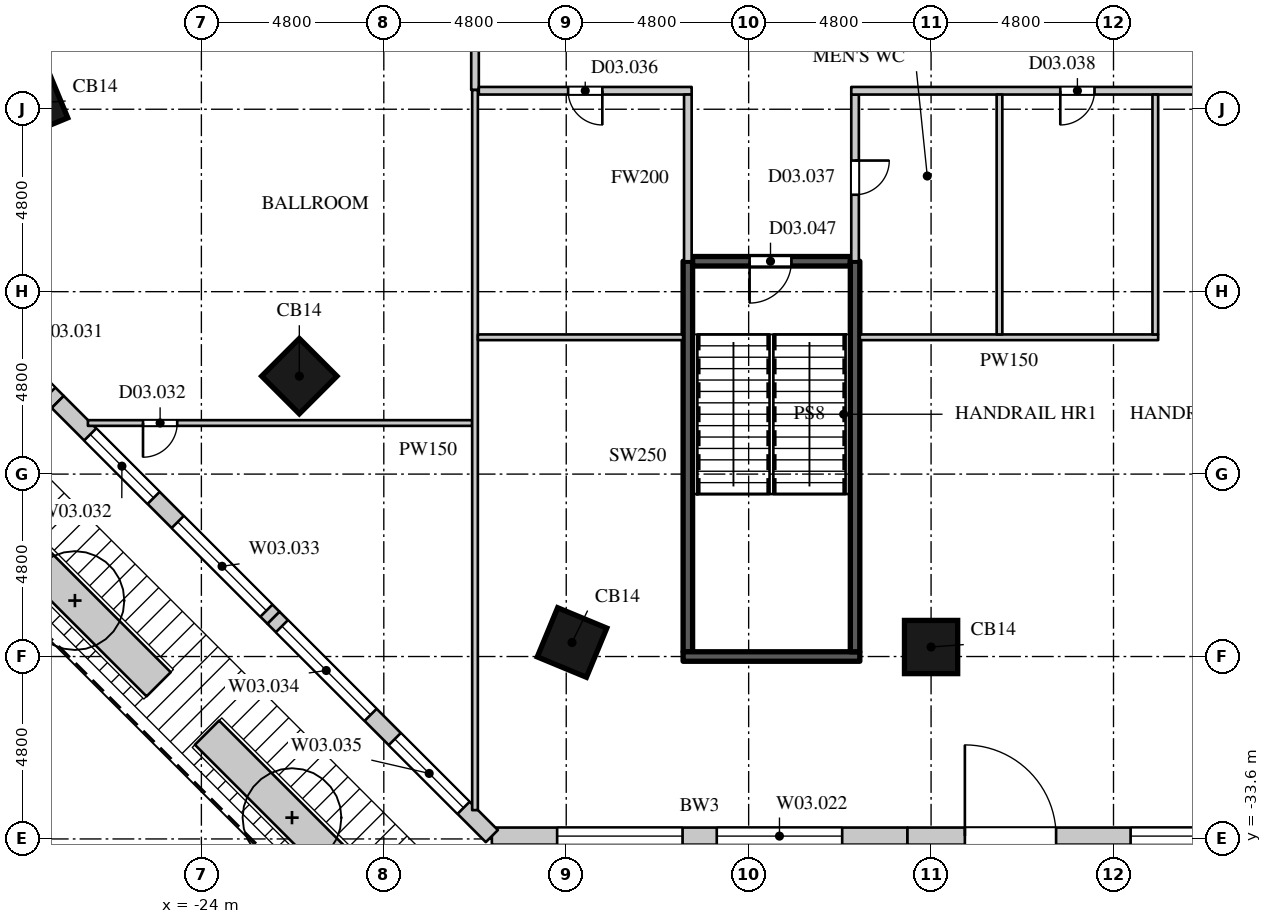
"""IFC4 building model, lengths in metres.
Left out: names, types, materials, properties, quantities, classifications, styles, units other than length and angle.
Written with IfcOpenShell. Run it as: python <this file> out.ifc"""

import sys

from ifc_helpers import new_model, si_unit, direction, frame, frame_2d, origin, origin_2d, place, context, subcontext, project, spatial, rectangle, extrude, element, fill, save


model = new_model("IFC4")
c1 = context("Model", 3, precision=1e-05, world=origin(), true_north=direction((0.0, 1.0)))
c2 = subcontext(c1, "Body", "Model", "MODEL_VIEW")
j1 = project(units=[si_unit("LENGTHUNIT", "METRE"), si_unit("PLANEANGLEUNIT", "RADIAN")], contexts=[c1])
p1 = place(None, origin())
s1 = spatial("IfcSite", under=j1, at=p1, CompositionType="ELEMENT")
p2 = place(p1, origin())
s2 = spatial("IfcBuilding", under=s1, at=p2, CompositionType="ELEMENT")
p3 = place(p2, frame((0.0, 0.0, 16.0)))
s3 = spatial("IfcBuildingStorey", under=s2, at=p3, CompositionType="ELEMENT", Elevation=16.0)
for number, where, z_axis, x_axis in (
    (1, (-4.8, -28.55, 0.0), (0.0, 0.0, 1.0), (1.0, 0.0, 0.0)),
    (2, (-14.247, -28.431, 0.0), (0.0, 0.0, 1.0), (0.924, -0.383, 0.0)),
    (3, (-21.423, -21.423, 0.0), (0.0, 0.0, 1.0), (0.707, -0.707, 0.0)),
    (4, (-28.431, -14.247, 0.0), (0.0, 0.0, 1.0), (0.383, -0.924, 0.0)),
):
    element("IfcColumn", number, at=place(p3, frame(where, z_axis=z_axis, x_axis=x_axis)), inside=s3, PredefinedType="COLUMN", context=c2, shape_type="SweptSolid", body=[
        extrude(rectangle(XDim=1.4, YDim=1.4, at=origin_2d()), origin(), (0.0, 0.0, 1.0), 5.0),
    ])
p4 = place(p3, frame((-33.525, -16.357, 0.0), z_axis=(0.0, 0.0, 1.0), x_axis=(0.707091755064, -0.70712180699, 0.0)))
e5 = element("IfcWall", 5, at=p4, inside=s3, PredefinedType="ELEMENTEDWALL", context=c2, shape_type="SweptSolid", body=[
    extrude(rectangle(XDim=8.124, YDim=0.45, at=frame_2d((4.062, 0.0))), origin(), (0.0, 0.0, 1.0), 4.7),
])
p5 = place(p4, frame((0.831, 0.0, 0.0)))
e6 = element("IfcOpeningElement", 6, at=p5, cuts=e5, PredefinedType="OPENING", context=c2, shape_type="SweptSolid", body=[
    extrude(rectangle(XDim=2.4, YDim=2.7, at=frame_2d((1.2, 1.35))), frame((0.0, 0.235, 0.0), z_axis=(0.0, -1.0, 0.0), x_axis=(1.0, 0.0, 0.0)), (0.0, 0.0, 1.0), 0.47),
])
p6 = place(p4, frame((4.512, 0.0, 1.05)))
e7 = element("IfcOpeningElement", 7, at=p6, cuts=e5, PredefinedType="OPENING", context=c2, shape_type="SweptSolid", body=[
    extrude(rectangle(XDim=3.3, YDim=2.7, at=frame_2d((1.65, 1.35))), frame((0.0, 0.235, 0.0), z_axis=(0.0, -1.0, 0.0), x_axis=(1.0, 0.0, 0.0)), (0.0, 0.0, 1.0), 0.47),
])
p7 = place(p3, frame((-27.781, -22.102, 0.0), z_axis=(0.0, 0.0, 1.0), x_axis=(0.707106781187, -0.707106781187, 0.0)))
e8 = element("IfcWall", 8, at=p7, inside=s3, PredefinedType="ELEMENTEDWALL", context=c2, shape_type="SweptSolid", body=[
    extrude(rectangle(XDim=8.031, YDim=0.45, at=frame_2d((4.016, 0.0))), origin(), (0.0, 0.0, 1.0), 4.7),
])
p8 = place(p7, frame((1.209, 0.0, 1.05)))
e9 = element("IfcOpeningElement", 9, at=p8, cuts=e8, PredefinedType="OPENING", context=c2, shape_type="SweptSolid", body=[
    extrude(rectangle(XDim=2.36, YDim=2.7, at=frame_2d((1.18, 1.35))), frame((0.0, 0.235, 0.0), z_axis=(0.0, -1.0, 0.0), x_axis=(1.0, 0.0, 0.0)), (0.0, 0.0, 1.0), 0.47),
])
p9 = place(p7, frame((4.465, 0.0, 1.05)))
e10 = element("IfcOpeningElement", 10, at=p9, cuts=e8, PredefinedType="OPENING", context=c2, shape_type="SweptSolid", body=[
    extrude(rectangle(XDim=3.3, YDim=2.7, at=frame_2d((1.65, 1.35))), frame((0.0, 0.235, 0.0), z_axis=(0.0, -1.0, 0.0), x_axis=(1.0, 0.0, 0.0)), (0.0, 0.0, 1.0), 0.47),
])
p10 = place(p3, frame((-22.102, -27.781, 0.0), z_axis=(0.0, 0.0, 1.0), x_axis=(0.70712180699, -0.707091755064, 0.0)))
e11 = element("IfcWall", 11, at=p10, inside=s3, PredefinedType="ELEMENTEDWALL", context=c2, shape_type="SweptSolid", body=[
    extrude(rectangle(XDim=8.124, YDim=0.45, at=frame_2d((4.062, 0.0))), origin(), (0.0, 0.0, 1.0), 4.7),
])
p11 = place(p10, frame((0.312, 0.0, 1.05)))
e12 = element("IfcOpeningElement", 12, at=p11, cuts=e11, PredefinedType="OPENING", context=c2, shape_type="SweptSolid", body=[
    extrude(rectangle(XDim=3.3, YDim=2.7, at=frame_2d((1.65, 1.35))), frame((0.0, 0.235, 0.0), z_axis=(0.0, -1.0, 0.0), x_axis=(1.0, 0.0, 0.0)), (0.0, 0.0, 1.0), 0.47),
])
p12 = place(p10, frame((4.512, 0.0, 1.05)))
e13 = element("IfcOpeningElement", 13, at=p12, cuts=e11, PredefinedType="OPENING", context=c2, shape_type="SweptSolid", body=[
    extrude(rectangle(XDim=2.56, YDim=2.7, at=frame_2d((1.28, 1.35))), frame((0.0, 0.235, 0.0), z_axis=(0.0, -1.0, 0.0), x_axis=(1.0, 0.0, 0.0)), (0.0, 0.0, 1.0), 0.47),
])
p13 = place(p3, frame((-16.357, -33.525, 0.0), z_axis=(0.0, 0.0, 1.0), x_axis=(1.0, 0.0, 0.0)))
e14 = element("IfcWall", 14, at=p13, inside=s3, PredefinedType="ELEMENTEDWALL", context=c2, shape_type="SweptSolid", body=[
    extrude(rectangle(XDim=10.936, YDim=0.45, at=frame_2d((5.468, 0.0))), origin(), (0.0, 0.0, 1.0), 4.7),
])
p14 = place(p13, frame((1.718, 0.0, 1.05)))
e15 = element("IfcOpeningElement", 15, at=p14, cuts=e14, PredefinedType="OPENING", context=c2, shape_type="SweptSolid", body=[
    extrude(rectangle(XDim=3.3, YDim=2.7, at=frame_2d((1.65, 1.35))), frame((0.0, 0.235, 0.0), z_axis=(0.0, -1.0, 0.0), x_axis=(1.0, 0.0, 0.0)), (0.0, 0.0, 1.0), 0.47),
])
p15 = place(p13, frame((5.918, 0.0, 1.05)))
e16 = element("IfcOpeningElement", 16, at=p15, cuts=e14, PredefinedType="OPENING", context=c2, shape_type="SweptSolid", body=[
    extrude(rectangle(XDim=3.3, YDim=2.7, at=frame_2d((1.65, 1.35))), frame((0.0, 0.235, 0.0), z_axis=(0.0, -1.0, 0.0), x_axis=(1.0, 0.0, 0.0)), (0.0, 0.0, 1.0), 0.47),
])
p16 = place(p3, frame((-5.421, -33.525, 0.0), z_axis=(0.0, 0.0, 1.0), x_axis=(1.0, 0.0, 0.0)))
e17 = element("IfcWall", 17, at=p16, inside=s3, PredefinedType="ELEMENTEDWALL", context=c2, shape_type="SweptSolid", body=[
    extrude(rectangle(XDim=10.843, YDim=0.45, at=frame_2d((5.421, 0.0))), origin(), (0.0, 0.0, 1.0), 4.7),
])
p17 = place(p16, frame((1.511, 0.0, 0.0)))
e18 = element("IfcOpeningElement", 18, at=p17, cuts=e17, PredefinedType="OPENING", context=c2, shape_type="SweptSolid", body=[
    extrude(rectangle(XDim=2.4, YDim=2.7, at=frame_2d((1.2, 1.35))), frame((0.0, 0.235, 0.0), z_axis=(0.0, -1.0, 0.0), x_axis=(1.0, 0.0, 0.0)), (0.0, 0.0, 1.0), 0.47),
])
p18 = place(p16, frame((5.871, 0.0, 1.05)))
e19 = element("IfcOpeningElement", 19, at=p18, cuts=e17, PredefinedType="OPENING", context=c2, shape_type="SweptSolid", body=[
    extrude(rectangle(XDim=3.3, YDim=2.7, at=frame_2d((1.65, 1.35))), frame((0.0, 0.235, 0.0), z_axis=(0.0, -1.0, 0.0), x_axis=(1.0, 0.0, 0.0)), (0.0, 0.0, 1.0), 0.47),
])
p19 = place(p3, frame((-29.531, -25.125, 0.0), z_axis=(0.0, 0.0, 1.0), x_axis=(0.707106781187, -0.707106781187, 0.0)))
e20 = element("IfcWall", 20, at=p19, inside=s3, PredefinedType="USERDEFINED", context=c2, shape_type="SweptSolid", body=[
    extrude(rectangle(XDim=6.231, YDim=0.9, at=frame_2d((3.115, 0.0))), origin(), (0.0, 0.0, 1.0), 0.9),
])
p20 = place(p3, frame((-23.852, -30.803, 0.0), z_axis=(0.0, 0.0, 1.0), x_axis=(0.70708747847, -0.707126083377, 0.0)))
e21 = element("IfcWall", 21, at=p20, inside=s3, PredefinedType="USERDEFINED", context=c2, shape_type="SweptSolid", body=[
    extrude(rectangle(XDim=6.324, YDim=0.9, at=frame_2d((3.162, 0.0))), origin(), (0.0, 0.0, 1.0), 0.9),
])
p21 = place(p3, frame((-16.8, -13.894, 0.0), z_axis=(0.0, 0.0, 1.0), x_axis=(0.0, 1.0, 0.0)))
e22 = element("IfcWall", 22, at=p21, inside=s3, PredefinedType="PARTITIONING", context=c2, shape_type="SweptSolid", body=[
    extrude(rectangle(XDim=2.594, YDim=0.2, at=frame_2d((1.297, 0.0))), origin(), (0.0, 0.0, 1.0), 4.4),
])
p22 = place(p3, frame((-16.7, -13.914, 0.0), z_axis=(0.0, 0.0, 1.0), x_axis=(1.0, 0.0, 0.0)))
e23 = element("IfcWall", 23, at=p22, inside=s3, PredefinedType="PARTITIONING", context=c2, shape_type="SweptSolid", body=[
    extrude(rectangle(XDim=5.6, YDim=0.2, at=frame_2d((2.8, 0.0))), origin(), (0.0, 0.0, 1.0), 4.4),
])
p23 = place(p22, frame((2.35, 0.0, 0.0)))
e24 = element("IfcOpeningElement", 24, at=p23, cuts=e23, PredefinedType="OPENING", context=c2, shape_type="SweptSolid", body=[
    extrude(rectangle(XDim=0.9, YDim=2.2, at=frame_2d((0.45, 1.1))), frame((0.0, 0.11, 0.0), z_axis=(0.0, -1.0, 0.0), x_axis=(1.0, 0.0, 0.0)), (0.0, 0.0, 1.0), 0.22),
])
p24 = place(p3, frame((-11.2, -18.4, 0.0), z_axis=(0.0, 0.0, 1.0), x_axis=(0.0, 1.0, 0.0)))
e25 = element("IfcWall", 25, at=p24, inside=s3, PredefinedType="PARTITIONING", context=c2, shape_type="SweptSolid", body=[
    extrude(rectangle(XDim=4.386, YDim=0.2, at=frame_2d((2.193, 0.0))), origin(), (0.0, 0.0, 1.0), 4.4),
])
p25 = place(p3, frame((-6.8, -18.4, 0.0), z_axis=(0.0, 0.0, 1.0), x_axis=(0.0, 1.0, 0.0)))
e26 = element("IfcWall", 26, at=p25, inside=s3, PredefinedType="PARTITIONING", context=c2, shape_type="SweptSolid", body=[
    extrude(rectangle(XDim=4.386, YDim=0.2, at=frame_2d((2.193, 0.0))), origin(), (0.0, 0.0, 1.0), 4.4),
])
p26 = place(p25, frame((1.75, 0.0, 0.0)))
e27 = element("IfcOpeningElement", 27, at=p26, cuts=e26, PredefinedType="OPENING", context=c2, shape_type="SweptSolid", body=[
    extrude(rectangle(XDim=0.9, YDim=2.2, at=frame_2d((0.45, 1.1))), frame((0.0, 0.11, 0.0), z_axis=(0.0, -1.0, 0.0), x_axis=(1.0, 0.0, 0.0)), (0.0, 0.0, 1.0), 0.22),
])
p27 = place(p3, frame((-6.9, -13.914, 0.0), z_axis=(0.0, 0.0, 1.0), x_axis=(1.0, 0.0, 0.0)))
e28 = element("IfcWall", 28, at=p27, inside=s3, PredefinedType="PARTITIONING", context=c2, shape_type="SweptSolid", body=[
    extrude(rectangle(XDim=13.8, YDim=0.2, at=frame_2d((6.9, 0.0))), origin(), (0.0, 0.0, 1.0), 4.4),
])
p28 = place(p27, frame((5.5, 0.0, 0.0)))
e29 = element("IfcOpeningElement", 29, at=p28, cuts=e28, PredefinedType="OPENING", context=c2, shape_type="SweptSolid", body=[
    extrude(rectangle(XDim=0.9, YDim=2.2, at=frame_2d((0.45, 1.1))), frame((0.0, 0.11, 0.0), z_axis=(0.0, -1.0, 0.0), x_axis=(1.0, 0.0, 0.0)), (0.0, 0.0, 1.0), 0.22),
])
p29 = place(p27, frame((10.05, 0.0, 0.0)))
e30 = element("IfcOpeningElement", 30, at=p29, cuts=e28, PredefinedType="OPENING", context=c2, shape_type="SweptSolid", body=[
    extrude(rectangle(XDim=1.6, YDim=2.4, at=frame_2d((0.8, 1.2))), frame((0.0, 0.11, 0.0), z_axis=(0.0, -1.0, 0.0), x_axis=(1.0, 0.0, 0.0)), (0.0, 0.0, 1.0), 0.22),
])
p30 = place(p3, frame((-26.986, -22.656, 0.0), z_axis=(0.0, 0.0, 1.0), x_axis=(1.0, 0.0, 0.0)))
e31 = element("IfcWall", 31, at=p30, inside=s3, PredefinedType="PARTITIONING", context=c2, shape_type="SweptSolid", body=[
    extrude(rectangle(XDim=10.111, YDim=0.15, at=frame_2d((5.055, 0.0))), origin(), (0.0, 0.0, 1.0), 4.4),
])
p31 = place(p30, frame((1.45, 0.0, 0.0)))
e32 = element("IfcOpeningElement", 32, at=p31, cuts=e31, PredefinedType="OPENING", context=c2, shape_type="SweptSolid", body=[
    extrude(rectangle(XDim=0.9, YDim=2.2, at=frame_2d((0.45, 1.1))), frame((0.0, 0.085, 0.0), z_axis=(0.0, -1.0, 0.0), x_axis=(1.0, 0.0, 0.0)), (0.0, 0.0, 1.0), 0.17),
])
p32 = place(p3, frame((-16.8, -32.842, 0.0), z_axis=(0.0, 0.0, 1.0), x_axis=(0.0, 1.0, 0.0)))
e33 = element("IfcWall", 33, at=p32, inside=s3, PredefinedType="PARTITIONING", context=c2, shape_type="SweptSolid", body=[
    extrude(rectangle(XDim=18.948, YDim=0.15, at=frame_2d((9.474, 0.0))), origin(), (0.0, 0.0, 1.0), 4.4),
])
p33 = place(p3, frame((-16.725, -20.4, 0.0), z_axis=(0.0, 0.0, 1.0), x_axis=(1.0, 0.0, 0.0)))
e34 = element("IfcWall", 34, at=p33, inside=s3, PredefinedType="PARTITIONING", context=c2, shape_type="SweptSolid", body=[
    extrude(rectangle(XDim=5.4, YDim=0.15, at=frame_2d((2.7, 0.0))), origin(), (0.0, 0.0, 1.0), 4.4),
])
p34 = place(p3, frame((-6.675, -20.4, 0.0), z_axis=(0.0, 0.0, 1.0), x_axis=(1.0, 0.0, 0.0)))
e35 = element("IfcWall", 35, at=p34, inside=s3, PredefinedType="PARTITIONING", context=c2, shape_type="SweptSolid", body=[
    extrude(rectangle(XDim=7.85, YDim=0.15, at=frame_2d((3.925, 0.0))), origin(), (0.0, 0.0, 1.0), 4.4),
])
for number, where, z_axis, x_axis in (
    (36, (-3.0, -20.325, 0.0), (0.0, 0.0, 1.0), (0.0, 1.0, 0.0)),
    (37, (1.1, -20.325, 0.0), (0.0, 0.0, 1.0), (0.0, 1.0, 0.0)),
):
    element("IfcWall", number, at=place(p3, frame(where, z_axis=z_axis, x_axis=x_axis)), inside=s3, PredefinedType="PARTITIONING", context=c2, shape_type="SweptSolid", body=[
        extrude(rectangle(XDim=6.312, YDim=0.15, at=frame_2d((3.156, 0.0))), origin(), (0.0, 0.0, 1.0), 4.4),
    ])
p35 = place(p3, frame((-11.2, -28.675, 0.0), z_axis=(0.0, 0.0, 1.0), x_axis=(0.0, 1.0, 0.0)))
e38 = element("IfcWall", 38, at=p35, inside=s3, PredefinedType="SHEAR", context=c2, shape_type="SweptSolid", body=[
    extrude(rectangle(XDim=10.275, YDim=0.25, at=frame_2d((5.138, 0.0))), origin(), (0.0, 0.0, 1.0), 4.65),
])
p36 = place(p3, frame((-11.325, -28.8, 0.0), z_axis=(0.0, 0.0, 1.0), x_axis=(1.0, 0.0, 0.0)))
e39 = element("IfcWall", 39, at=p36, inside=s3, PredefinedType="SHEAR", context=c2, shape_type="SweptSolid", body=[
    extrude(rectangle(XDim=4.65, YDim=0.25, at=frame_2d((2.325, 0.0))), origin(), (0.0, 0.0, 1.0), 4.65),
])
p37 = place(p3, frame((-11.075, -18.4, 0.0), z_axis=(0.0, 0.0, 1.0), x_axis=(1.0, 0.0, 0.0)))
e40 = element("IfcWall", 40, at=p37, inside=s3, PredefinedType="SHEAR", context=c2, shape_type="SweptSolid", body=[
    extrude(rectangle(XDim=4.15, YDim=0.25, at=frame_2d((2.075, 0.0))), origin(), (0.0, 0.0, 1.0), 4.65),
])
p38 = place(p37, frame((1.5, 0.0, 0.0)))
e41 = element("IfcOpeningElement", 41, at=p38, cuts=e40, PredefinedType="OPENING", context=c2, shape_type="SweptSolid", body=[
    extrude(rectangle(XDim=1.1, YDim=2.2, at=frame_2d((0.55, 1.1))), frame((0.0, 0.135, 0.0), z_axis=(0.0, -1.0, 0.0), x_axis=(1.0, 0.0, 0.0)), (0.0, 0.0, 1.0), 0.27),
])
p39 = place(p3, frame((-6.8, -28.675, 0.0), z_axis=(0.0, 0.0, 1.0), x_axis=(0.0, 1.0, 0.0)))
e42 = element("IfcWall", 42, at=p39, inside=s3, PredefinedType="SHEAR", context=c2, shape_type="SweptSolid", body=[
    extrude(rectangle(XDim=10.275, YDim=0.25, at=frame_2d((5.138, 0.0))), origin(), (0.0, 0.0, 1.0), 4.65),
])
p40 = place(p6, origin())
e43 = element("IfcWindow", 43, at=p40, inside=s3, PartitioningType="SINGLE_PANEL", PredefinedType="WINDOW", context=c2, shape_type="SweptSolid", body=[
    extrude(rectangle(XDim=3.3, YDim=2.7, at=frame_2d((1.65, 1.35))), frame((0.0, 0.135, 0.0), z_axis=(0.0, -1.0, 0.0), x_axis=(1.0, 0.0, 0.0)), (0.0, 0.0, 1.0), 0.06),
])
fill(e7, e43)
p41 = place(p8, origin())
e44 = element("IfcWindow", 44, at=p41, inside=s3, PartitioningType="SINGLE_PANEL", PredefinedType="WINDOW", context=c2, shape_type="SweptSolid", body=[
    extrude(rectangle(XDim=2.36, YDim=2.7, at=frame_2d((1.18, 1.35))), frame((0.0, 0.135, 0.0), z_axis=(0.0, -1.0, 0.0), x_axis=(1.0, 0.0, 0.0)), (0.0, 0.0, 1.0), 0.06),
])
fill(e9, e44)
p42 = place(p9, origin())
e45 = element("IfcWindow", 45, at=p42, inside=s3, PartitioningType="SINGLE_PANEL", PredefinedType="WINDOW", context=c2, shape_type="SweptSolid", body=[
    extrude(rectangle(XDim=3.3, YDim=2.7, at=frame_2d((1.65, 1.35))), frame((0.0, 0.135, 0.0), z_axis=(0.0, -1.0, 0.0), x_axis=(1.0, 0.0, 0.0)), (0.0, 0.0, 1.0), 0.06),
])
fill(e10, e45)
p43 = place(p11, origin())
e46 = element("IfcWindow", 46, at=p43, inside=s3, PartitioningType="SINGLE_PANEL", PredefinedType="WINDOW", context=c2, shape_type="SweptSolid", body=[
    extrude(rectangle(XDim=3.3, YDim=2.7, at=frame_2d((1.65, 1.35))), frame((0.0, 0.135, 0.0), z_axis=(0.0, -1.0, 0.0), x_axis=(1.0, 0.0, 0.0)), (0.0, 0.0, 1.0), 0.06),
])
fill(e12, e46)
p44 = place(p12, origin())
e47 = element("IfcWindow", 47, at=p44, inside=s3, PartitioningType="SINGLE_PANEL", PredefinedType="WINDOW", context=c2, shape_type="SweptSolid", body=[
    extrude(rectangle(XDim=2.56, YDim=2.7, at=frame_2d((1.28, 1.35))), frame((0.0, 0.135, 0.0), z_axis=(0.0, -1.0, 0.0), x_axis=(1.0, 0.0, 0.0)), (0.0, 0.0, 1.0), 0.06),
])
fill(e13, e47)
p45 = place(p14, origin())
e48 = element("IfcWindow", 48, at=p45, inside=s3, PartitioningType="SINGLE_PANEL", PredefinedType="WINDOW", context=c2, shape_type="SweptSolid", body=[
    extrude(rectangle(XDim=3.3, YDim=2.7, at=frame_2d((1.65, 1.35))), frame((0.0, 0.135, 0.0), z_axis=(0.0, -1.0, 0.0), x_axis=(1.0, 0.0, 0.0)), (0.0, 0.0, 1.0), 0.06),
])
fill(e15, e48)
p46 = place(p15, origin())
e49 = element("IfcWindow", 49, at=p46, inside=s3, PartitioningType="SINGLE_PANEL", PredefinedType="WINDOW", context=c2, shape_type="SweptSolid", body=[
    extrude(rectangle(XDim=3.3, YDim=2.7, at=frame_2d((1.65, 1.35))), frame((0.0, 0.135, 0.0), z_axis=(0.0, -1.0, 0.0), x_axis=(1.0, 0.0, 0.0)), (0.0, 0.0, 1.0), 0.06),
])
fill(e16, e49)
p47 = place(p17, origin())
e50 = element("IfcDoor", 50, at=p47, inside=s3, OperationType="SINGLE_SWING_LEFT", PredefinedType="DOOR", context=c2, shape_type="SweptSolid", body=[
    extrude(rectangle(XDim=2.4, YDim=2.7, at=frame_2d((1.2, 1.35))), frame((0.0, 0.13, 0.0), z_axis=(0.0, -1.0, 0.0), x_axis=(1.0, 0.0, 0.0)), (0.0, 0.0, 1.0), 0.05),
])
fill(e18, e50)
p48 = place(p18, origin())
e51 = element("IfcWindow", 51, at=p48, inside=s3, PartitioningType="SINGLE_PANEL", PredefinedType="WINDOW", context=c2, shape_type="SweptSolid", body=[
    extrude(rectangle(XDim=3.3, YDim=2.7, at=frame_2d((1.65, 1.35))), frame((0.0, 0.135, 0.0), z_axis=(0.0, -1.0, 0.0), x_axis=(1.0, 0.0, 0.0)), (0.0, 0.0, 1.0), 0.06),
])
fill(e19, e51)
p49 = place(p31, origin())
e52 = element("IfcDoor", 52, at=p49, inside=s3, OperationType="SINGLE_SWING_RIGHT", PredefinedType="DOOR", context=c2, shape_type="SweptSolid", body=[
    extrude(rectangle(XDim=0.9, YDim=2.2, at=frame_2d((0.45, 1.1))), frame((0.0, 0.025, 0.0), z_axis=(0.0, -1.0, 0.0), x_axis=(1.0, 0.0, 0.0)), (0.0, 0.0, 1.0), 0.05),
])
fill(e32, e52)
p50 = place(p23, origin())
e53 = element("IfcDoor", 53, at=p50, inside=s3, OperationType="SINGLE_SWING_LEFT", PredefinedType="DOOR", context=c2, shape_type="SweptSolid", body=[
    extrude(rectangle(XDim=0.9, YDim=2.2, at=frame_2d((0.45, 1.1))), frame((0.0, 0.025, 0.0), z_axis=(0.0, -1.0, 0.0), x_axis=(1.0, 0.0, 0.0)), (0.0, 0.0, 1.0), 0.05),
])
fill(e24, e53)
p51 = place(p26, origin())
e54 = element("IfcDoor", 54, at=p51, inside=s3, OperationType="SINGLE_SWING_LEFT", PredefinedType="DOOR", context=c2, shape_type="SweptSolid", body=[
    extrude(rectangle(XDim=0.9, YDim=2.2, at=frame_2d((0.45, 1.1))), frame((0.0, 0.025, 0.0), z_axis=(0.0, -1.0, 0.0), x_axis=(1.0, 0.0, 0.0)), (0.0, 0.0, 1.0), 0.05),
])
fill(e27, e54)
p52 = place(p28, origin())
e55 = element("IfcDoor", 55, at=p52, inside=s3, OperationType="SINGLE_SWING_RIGHT", PredefinedType="DOOR", context=c2, shape_type="SweptSolid", body=[
    extrude(rectangle(XDim=0.9, YDim=2.2, at=frame_2d((0.45, 1.1))), frame((0.0, 0.025, 0.0), z_axis=(0.0, -1.0, 0.0), x_axis=(1.0, 0.0, 0.0)), (0.0, 0.0, 1.0), 0.05),
])
fill(e29, e55)
p53 = place(p38, origin())
e56 = element("IfcDoor", 56, at=p53, inside=s3, OperationType="SINGLE_SWING_RIGHT", PredefinedType="DOOR", context=c2, shape_type="SweptSolid", body=[
    extrude(rectangle(XDim=1.1, YDim=2.2, at=frame_2d((0.55, 1.1))), frame((0.0, 0.025, 0.0), z_axis=(0.0, -1.0, 0.0), x_axis=(1.0, 0.0, 0.0)), (0.0, 0.0, 1.0), 0.05),
])
fill(e41, e56)
save(model, sys.argv[1])
